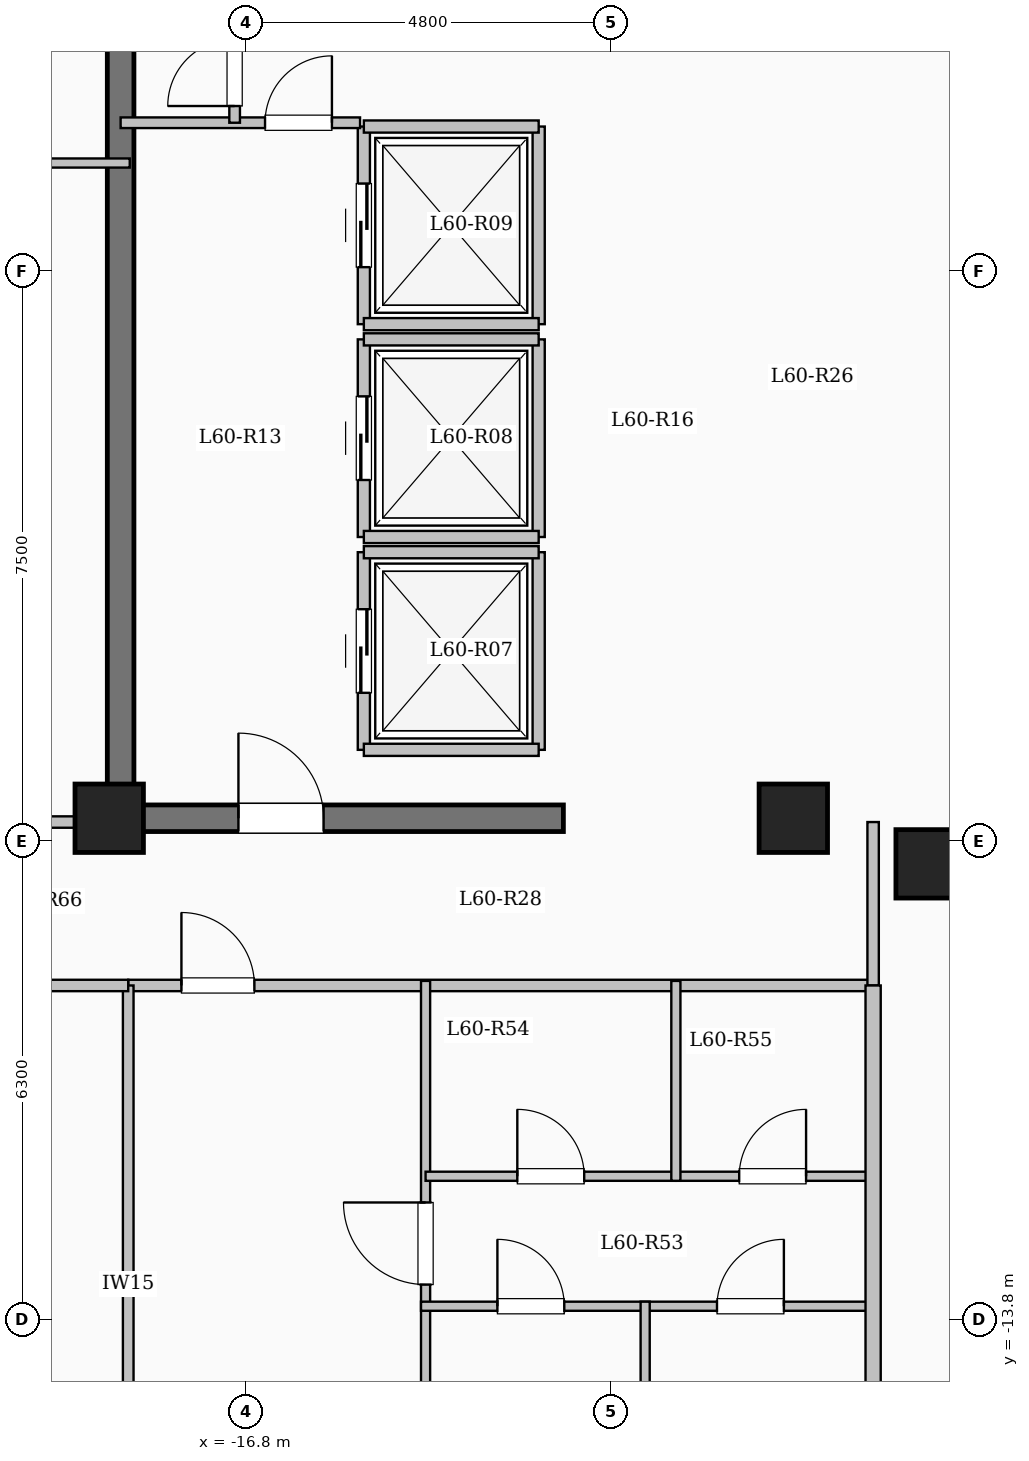
"""IFC4 building model, lengths in metres.
Left out: names, types, materials, properties, quantities, classifications, styles, units other than length and angle.
Written with IfcOpenShell. Run it as: python <this file> out.ifc"""

import sys

from ifc_helpers import new_model, si_unit, direction, frame, frame_2d, origin, origin_2d, place, context, subcontext, project, spatial, rectangle, extrude, element, fill, save


model = new_model("IFC4")
c1 = context("Model", 3, precision=1e-05, world=origin(), true_north=direction((0.0, 1.0)))
c2 = subcontext(c1, "Body", "Model", "MODEL_VIEW")
j1 = project(units=[si_unit("LENGTHUNIT", "METRE"), si_unit("PLANEANGLEUNIT", "RADIAN")], contexts=[c1])
p1 = place(None, origin())
s1 = spatial("IfcSite", under=j1, at=p1, CompositionType="ELEMENT")
p2 = place(p1, origin())
s2 = spatial("IfcBuilding", under=s1, at=p2, CompositionType="ELEMENT")
p3 = place(p2, frame((0.0, 0.0, 220.4)))
s3 = spatial("IfcBuildingStorey", under=s2, at=p3, CompositionType="ELEMENT", Elevation=220.4)
for number, where, z_axis, x_axis in (
    (1, (-7.8, -7.8, 0.0), (0.0, 0.0, 1.0), (1.0, 0.0, 0.0)),
    (2, (-9.6, -7.2, 0.0), (0.0, 0.0, 1.0), (1.0, 0.0, 0.0)),
    (3, (-18.6, -7.2, 0.0), (0.0, 0.0, 1.0), (1.0, 0.0, 0.0)),
):
    element("IfcColumn", number, at=place(p3, frame(where, z_axis=z_axis, x_axis=x_axis)), inside=s3, PredefinedType="COLUMN", context=c2, shape_type="SweptSolid", body=[
        extrude(rectangle(XDim=0.9, YDim=0.9, at=origin_2d()), origin(), (0.0, 0.0, 1.0), 3.35),
    ])
p4 = place(p3, frame((-15.25, -6.3, 0.0), z_axis=(0.0, 0.0, 1.0), x_axis=(0.0, 1.0, 0.0)))
e4 = element("IfcWall", 4, at=p4, inside=s3, PredefinedType="SOLIDWALL", context=c2, shape_type="SweptSolid", body=[
    extrude(rectangle(XDim=2.6, YDim=0.16, at=frame_2d((1.3, 0.0))), origin(), (0.0, 0.0, 1.0), 3.1),
])
p5 = place(p4, frame((0.75, 0.0, 0.0)))
e5 = element("IfcOpeningElement", 5, at=p5, cuts=e4, PredefinedType="OPENING", context=c2, shape_type="SweptSolid", body=[
    extrude(rectangle(XDim=1.1, YDim=2.15, at=frame_2d((0.55, 1.075))), frame((0.0, 0.09, 0.0), z_axis=(0.0, -1.0, 0.0), x_axis=(1.0, 0.0, 0.0)), (0.0, 0.0, 1.0), 0.18),
])
p6 = place(p3, frame((-12.95, -6.3, 0.0), z_axis=(0.0, 0.0, 1.0), x_axis=(0.0, 1.0, 0.0)))
e6 = element("IfcWall", 6, at=p6, inside=s3, PredefinedType="SOLIDWALL", context=c2, shape_type="SweptSolid", body=[
    extrude(rectangle(XDim=2.6, YDim=0.16, at=frame_2d((1.3, 0.0))), origin(), (0.0, 0.0, 1.0), 3.1),
])
for number, where, z_axis, x_axis in (
    (7, (-15.25, -6.3, 0.0), (0.0, 0.0, 1.0), (1.0, 0.0, 0.0)),
    (8, (-15.25, -3.7, 0.0), (0.0, 0.0, 1.0), (1.0, 0.0, 0.0)),
):
    element("IfcWall", number, at=place(p3, frame(where, z_axis=z_axis, x_axis=x_axis)), inside=s3, PredefinedType="SOLIDWALL", context=c2, shape_type="SweptSolid", body=[
        extrude(rectangle(XDim=2.3, YDim=0.16, at=frame_2d((1.15, 0.0))), origin(), (0.0, 0.0, 1.0), 3.1),
    ])
p7 = place(p3, frame((-15.25, -3.5, 0.0), z_axis=(0.0, 0.0, 1.0), x_axis=(0.0, 1.0, 0.0)))
e9 = element("IfcWall", 9, at=p7, inside=s3, PredefinedType="SOLIDWALL", context=c2, shape_type="SweptSolid", body=[
    extrude(rectangle(XDim=2.6, YDim=0.16, at=frame_2d((1.3, 0.0))), origin(), (0.0, 0.0, 1.0), 3.1),
])
p8 = place(p7, frame((0.75, 0.0, 0.0)))
e10 = element("IfcOpeningElement", 10, at=p8, cuts=e9, PredefinedType="OPENING", context=c2, shape_type="SweptSolid", body=[
    extrude(rectangle(XDim=1.1, YDim=2.15, at=frame_2d((0.55, 1.075))), frame((0.0, 0.09, 0.0), z_axis=(0.0, -1.0, 0.0), x_axis=(1.0, 0.0, 0.0)), (0.0, 0.0, 1.0), 0.18),
])
p9 = place(p3, frame((-12.95, -3.5, 0.0), z_axis=(0.0, 0.0, 1.0), x_axis=(0.0, 1.0, 0.0)))
e11 = element("IfcWall", 11, at=p9, inside=s3, PredefinedType="SOLIDWALL", context=c2, shape_type="SweptSolid", body=[
    extrude(rectangle(XDim=2.6, YDim=0.16, at=frame_2d((1.3, 0.0))), origin(), (0.0, 0.0, 1.0), 3.1),
])
for number, where, z_axis, x_axis in (
    (12, (-15.25, -3.5, 0.0), (0.0, 0.0, 1.0), (1.0, 0.0, 0.0)),
    (13, (-15.25, -0.9, 0.0), (0.0, 0.0, 1.0), (1.0, 0.0, 0.0)),
):
    element("IfcWall", number, at=place(p3, frame(where, z_axis=z_axis, x_axis=x_axis)), inside=s3, PredefinedType="SOLIDWALL", context=c2, shape_type="SweptSolid", body=[
        extrude(rectangle(XDim=2.3, YDim=0.16, at=frame_2d((1.15, 0.0))), origin(), (0.0, 0.0, 1.0), 3.1),
    ])
p10 = place(p3, frame((-15.25, -0.7, 0.0), z_axis=(0.0, 0.0, 1.0), x_axis=(0.0, 1.0, 0.0)))
e14 = element("IfcWall", 14, at=p10, inside=s3, PredefinedType="SOLIDWALL", context=c2, shape_type="SweptSolid", body=[
    extrude(rectangle(XDim=2.6, YDim=0.16, at=frame_2d((1.3, 0.0))), origin(), (0.0, 0.0, 1.0), 3.1),
])
p11 = place(p10, frame((0.75, 0.0, 0.0)))
e15 = element("IfcOpeningElement", 15, at=p11, cuts=e14, PredefinedType="OPENING", context=c2, shape_type="SweptSolid", body=[
    extrude(rectangle(XDim=1.1, YDim=2.15, at=frame_2d((0.55, 1.075))), frame((0.0, 0.09, 0.0), z_axis=(0.0, -1.0, 0.0), x_axis=(1.0, 0.0, 0.0)), (0.0, 0.0, 1.0), 0.18),
])
p12 = place(p3, frame((-12.95, -0.7, 0.0), z_axis=(0.0, 0.0, 1.0), x_axis=(0.0, 1.0, 0.0)))
e16 = element("IfcWall", 16, at=p12, inside=s3, PredefinedType="SOLIDWALL", context=c2, shape_type="SweptSolid", body=[
    extrude(rectangle(XDim=2.6, YDim=0.16, at=frame_2d((1.3, 0.0))), origin(), (0.0, 0.0, 1.0), 3.1),
])
for number, where, z_axis, x_axis in (
    (17, (-15.25, -0.7, 0.0), (0.0, 0.0, 1.0), (1.0, 0.0, 0.0)),
    (18, (-15.25, 1.9, 0.0), (0.0, 0.0, 1.0), (1.0, 0.0, 0.0)),
):
    element("IfcWall", number, at=place(p3, frame(where, z_axis=z_axis, x_axis=x_axis)), inside=s3, PredefinedType="SOLIDWALL", context=c2, shape_type="SweptSolid", body=[
        extrude(rectangle(XDim=2.3, YDim=0.16, at=frame_2d((1.15, 0.0))), origin(), (0.0, 0.0, 1.0), 3.1),
    ])
p13 = place(p3, frame((-18.45, -7.375, 0.0), z_axis=(0.0, 0.0, 1.0), x_axis=(0.0, 1.0, 0.0)))
e19 = element("IfcWall", 19, at=p13, inside=s3, PredefinedType="SHEAR", context=c2, shape_type="SweptSolid", body=[
    extrude(rectangle(XDim=14.05, YDim=0.35, at=frame_2d((7.025, 0.0))), origin(), (0.0, 0.0, 1.0), 3.35),
])
p14 = place(p3, frame((-18.625, -7.2, 0.0), z_axis=(0.0, 0.0, 1.0), x_axis=(1.0, 0.0, 0.0)))
e20 = element("IfcWall", 20, at=p14, inside=s3, PredefinedType="SHEAR", context=c2, shape_type="SweptSolid", body=[
    extrude(rectangle(XDim=6.0, YDim=0.35, at=frame_2d((3.0, 0.0))), origin(), (0.0, 0.0, 1.0), 3.35),
])
p15 = place(p14, frame((1.725, 0.0, 0.0)))
e21 = element("IfcOpeningElement", 21, at=p15, cuts=e20, PredefinedType="OPENING", context=c2, shape_type="SweptSolid", body=[
    extrude(rectangle(XDim=1.12, YDim=2.15, at=frame_2d((0.56, 1.075))), frame((0.0, 0.185, 0.0), z_axis=(0.0, -1.0, 0.0), x_axis=(1.0, 0.0, 0.0)), (0.0, 0.0, 1.0), 0.37),
])
p16 = place(p3, frame((-18.45, 1.95, 0.0), z_axis=(0.0, 0.0, 1.0), x_axis=(1.0, 0.0, 0.0)))
e22 = element("IfcWall", 22, at=p16, inside=s3, PredefinedType="PARTITIONING", context=c2, shape_type="SweptSolid", body=[
    extrude(rectangle(XDim=3.15, YDim=0.14, at=frame_2d((1.575, 0.0))), origin(), (0.0, 0.0, 1.0), 3.1),
])
p17 = place(p16, frame((1.9, 0.0, 0.0)))
e23 = element("IfcOpeningElement", 23, at=p17, cuts=e22, PredefinedType="OPENING", context=c2, shape_type="SweptSolid", body=[
    extrude(rectangle(XDim=0.88, YDim=2.1, at=frame_2d((0.44, 1.05))), frame((0.0, 0.08, 0.0), z_axis=(0.0, -1.0, 0.0), x_axis=(1.0, 0.0, 0.0)), (0.0, 0.0, 1.0), 0.16),
])
p18 = place(p3, frame((-16.95, 1.95, 0.0), z_axis=(0.0, 0.0, 1.0), x_axis=(0.0, 1.0, 0.0)))
e24 = element("IfcWall", 24, at=p18, inside=s3, PredefinedType="PARTITIONING", context=c2, shape_type="SweptSolid", body=[
    extrude(rectangle(XDim=1.3, YDim=0.14, at=frame_2d((0.65, 0.0))), origin(), (0.0, 0.0, 1.0), 3.1),
])
p19 = place(p18, frame((0.22, 0.0, 0.0)))
e25 = element("IfcOpeningElement", 25, at=p19, cuts=e24, PredefinedType="OPENING", context=c2, shape_type="SweptSolid", body=[
    extrude(rectangle(XDim=0.88, YDim=2.1, at=frame_2d((0.44, 1.05))), frame((0.0, 0.08, 0.0), z_axis=(0.0, -1.0, 0.0), x_axis=(1.0, 0.0, 0.0)), (0.0, 0.0, 1.0), 0.16),
])
p20 = place(p3, frame((-18.35, -9.4, 0.0), z_axis=(0.0, 0.0, 1.0), x_axis=(1.0, 0.0, 0.0)))
e26 = element("IfcWall", 26, at=p20, inside=s3, PredefinedType="PARTITIONING", context=c2, shape_type="SweptSolid", body=[
    extrude(rectangle(XDim=9.8, YDim=0.15, at=frame_2d((4.9, 0.0))), origin(), (0.0, 0.0, 1.0), 3.1),
])
p21 = place(p20, frame((0.7, 0.0, 0.0)))
e27 = element("IfcOpeningElement", 27, at=p21, cuts=e26, PredefinedType="OPENING", context=c2, shape_type="SweptSolid", body=[
    extrude(rectangle(XDim=0.96, YDim=2.15, at=frame_2d((0.48, 1.075))), frame((0.0, 0.085, 0.0), z_axis=(0.0, -1.0, 0.0), x_axis=(1.0, 0.0, 0.0)), (0.0, 0.0, 1.0), 0.17),
])
p22 = place(p3, frame((-8.55, -9.4, 0.0), z_axis=(0.0, 0.0, 1.0), x_axis=(0.0, 1.0, 0.0)))
e28 = element("IfcWall", 28, at=p22, inside=s3, PredefinedType="PARTITIONING", context=c2, shape_type="SweptSolid", body=[
    extrude(rectangle(XDim=2.15, YDim=0.15, at=frame_2d((1.075, 0.0))), origin(), (0.0, 0.0, 1.0), 3.1),
])
p23 = place(p3, frame((-14.438, -20.9, 0.0), z_axis=(0.0, 0.0, 1.0), x_axis=(0.0, 1.0, 0.0)))
e29 = element("IfcWall", 29, at=p23, inside=s3, PredefinedType="PARTITIONING", context=c2, shape_type="SweptSolid", body=[
    extrude(rectangle(XDim=11.56, YDim=0.12, at=frame_2d((5.78, 0.0))), origin(), (0.0, 0.0, 1.0), 3.1),
])
p24 = place(p23, frame((7.565, 0.0, 0.0)))
e30 = element("IfcOpeningElement", 30, at=p24, cuts=e29, PredefinedType="OPENING", context=c2, shape_type="SweptSolid", body=[
    extrude(rectangle(XDim=1.08, YDim=2.15, at=frame_2d((0.54, 1.075))), frame((0.0, 0.07, 0.0), z_axis=(0.0, -1.0, 0.0), x_axis=(1.0, 0.0, 0.0)), (0.0, 0.0, 1.0), 0.14),
])
p25 = place(p3, frame((-14.438, -11.91, 0.0), z_axis=(0.0, 0.0, 1.0), x_axis=(1.0, 0.0, 0.0)))
e31 = element("IfcWall", 31, at=p25, inside=s3, PredefinedType="PARTITIONING", context=c2, shape_type="SweptSolid", body=[
    extrude(rectangle(XDim=3.293, YDim=0.12, at=frame_2d((1.646, 0.0))), origin(), (0.0, 0.0, 1.0), 3.1),
])
p26 = place(p25, frame((1.207, 0.0, 0.0)))
e32 = element("IfcOpeningElement", 32, at=p26, cuts=e31, PredefinedType="OPENING", context=c2, shape_type="SweptSolid", body=[
    extrude(rectangle(XDim=0.88, YDim=2.1, at=frame_2d((0.44, 1.05))), frame((0.0, 0.07, 0.0), z_axis=(0.0, -1.0, 0.0), x_axis=(1.0, 0.0, 0.0)), (0.0, 0.0, 1.0), 0.14),
])
p27 = place(p3, frame((-11.145, -11.91, 0.0), z_axis=(0.0, 0.0, 1.0), x_axis=(1.0, 0.0, 0.0)))
e33 = element("IfcWall", 33, at=p27, inside=s3, PredefinedType="PARTITIONING", context=c2, shape_type="SweptSolid", body=[
    extrude(rectangle(XDim=2.545, YDim=0.12, at=frame_2d((1.272, 0.0))), origin(), (0.0, 0.0, 1.0), 3.1),
])
p28 = place(p27, frame((0.833, 0.0, 0.0)))
e34 = element("IfcOpeningElement", 34, at=p28, cuts=e33, PredefinedType="OPENING", context=c2, shape_type="SweptSolid", body=[
    extrude(rectangle(XDim=0.88, YDim=2.1, at=frame_2d((0.44, 1.05))), frame((0.0, 0.07, 0.0), z_axis=(0.0, -1.0, 0.0), x_axis=(1.0, 0.0, 0.0)), (0.0, 0.0, 1.0), 0.14),
])
p29 = place(p3, frame((-14.498, -13.62, 0.0), z_axis=(0.0, 0.0, 1.0), x_axis=(1.0, 0.0, 0.0)))
e35 = element("IfcWall", 35, at=p29, inside=s3, PredefinedType="PARTITIONING", context=c2, shape_type="SweptSolid", body=[
    extrude(rectangle(XDim=5.958, YDim=0.12, at=frame_2d((2.979, 0.0))), origin(), (0.0, 0.0, 1.0), 3.1),
])
p30 = place(p29, frame((1.005, 0.0, 0.0)))
e36 = element("IfcOpeningElement", 36, at=p30, cuts=e35, PredefinedType="OPENING", context=c2, shape_type="SweptSolid", body=[
    extrude(rectangle(XDim=0.88, YDim=2.1, at=frame_2d((0.44, 1.05))), frame((0.0, 0.07, 0.0), z_axis=(0.0, -1.0, 0.0), x_axis=(1.0, 0.0, 0.0)), (0.0, 0.0, 1.0), 0.14),
])
p31 = place(p29, frame((3.894, 0.0, 0.0)))
e37 = element("IfcOpeningElement", 37, at=p31, cuts=e35, PredefinedType="OPENING", context=c2, shape_type="SweptSolid", body=[
    extrude(rectangle(XDim=0.88, YDim=2.1, at=frame_2d((0.44, 1.05))), frame((0.0, 0.07, 0.0), z_axis=(0.0, -1.0, 0.0), x_axis=(1.0, 0.0, 0.0)), (0.0, 0.0, 1.0), 0.14),
])
p32 = place(p3, frame((-11.145, -11.97, 0.0), z_axis=(0.0, 0.0, 1.0), x_axis=(0.0, 1.0, 0.0)))
e38 = element("IfcWall", 38, at=p32, inside=s3, PredefinedType="PARTITIONING", context=c2, shape_type="SweptSolid", body=[
    extrude(rectangle(XDim=2.63, YDim=0.12, at=frame_2d((1.315, 0.0))), origin(), (0.0, 0.0, 1.0), 3.1),
])
p33 = place(p3, frame((-11.549, -20.9, 0.0), z_axis=(0.0, 0.0, 1.0), x_axis=(0.0, 1.0, 0.0)))
e39 = element("IfcWall", 39, at=p33, inside=s3, PredefinedType="PARTITIONING", context=c2, shape_type="SweptSolid", body=[
    extrude(rectangle(XDim=7.34, YDim=0.12, at=frame_2d((3.67, 0.0))), origin(), (0.0, 0.0, 1.0), 3.1),
])
p34 = place(p3, frame((-8.55, -21.504, 0.0), z_axis=(0.0, 0.0, 1.0), x_axis=(0.0, 1.0, 0.0)))
e40 = element("IfcWall", 40, at=p34, inside=s3, PredefinedType="SOLIDWALL", context=c2, shape_type="SweptSolid", body=[
    extrude(rectangle(XDim=12.104, YDim=0.2, at=frame_2d((6.052, 0.0))), origin(), (0.0, 0.0, 1.0), 3.1),
])
p35 = place(p3, frame((-23.58, -7.25, 0.0), z_axis=(0.0, 0.0, 1.0), x_axis=(1.0, 0.0, 0.0)))
e41 = element("IfcWall", 41, at=p35, inside=s3, PredefinedType="PARTITIONING", context=c2, shape_type="SweptSolid", body=[
    extrude(rectangle(XDim=5.13, YDim=0.15, at=frame_2d((2.565, 0.0))), origin(), (0.0, 0.0, 1.0), 3.1),
])
p36 = place(p35, frame((2.18, 0.0, 0.0)))
e42 = element("IfcOpeningElement", 42, at=p36, cuts=e41, PredefinedType="OPENING", context=c2, shape_type="SweptSolid", body=[
    extrude(rectangle(XDim=0.96, YDim=2.15, at=frame_2d((0.48, 1.075))), frame((0.0, 0.085, 0.0), z_axis=(0.0, -1.0, 0.0), x_axis=(1.0, 0.0, 0.0)), (0.0, 0.0, 1.0), 0.17),
])
p37 = place(p3, frame((-18.35, -17.25, 0.0), z_axis=(0.0, 0.0, 1.0), x_axis=(0.0, 1.0, 0.0)))
e43 = element("IfcWall", 43, at=p37, inside=s3, PredefinedType="PARTITIONING", context=c2, shape_type="SweptSolid", body=[
    extrude(rectangle(XDim=7.85, YDim=0.14, at=frame_2d((3.925, 0.0))), origin(), (0.0, 0.0, 1.0), 3.1),
])
p38 = place(p3, frame((-23.58, -9.4, 0.0), z_axis=(0.0, 0.0, 1.0), x_axis=(1.0, 0.0, 0.0)))
e44 = element("IfcWall", 44, at=p38, inside=s3, PredefinedType="PARTITIONING", context=c2, shape_type="SweptSolid", body=[
    extrude(rectangle(XDim=5.23, YDim=0.15, at=frame_2d((2.615, 0.0))), origin(), (0.0, 0.0, 1.0), 3.1),
])
p39 = place(p38, frame((2.14, 0.0, 0.0)))
e45 = element("IfcOpeningElement", 45, at=p39, cuts=e44, PredefinedType="OPENING", context=c2, shape_type="SweptSolid", body=[
    extrude(rectangle(XDim=0.95, YDim=2.15, at=frame_2d((0.475, 1.075))), frame((0.0, 0.085, 0.0), z_axis=(0.0, -1.0, 0.0), x_axis=(1.0, 0.0, 0.0)), (0.0, 0.0, 1.0), 0.17),
])
p40 = place(p3, frame((-23.7, 1.42, 0.0), z_axis=(0.0, 0.0, 1.0), x_axis=(1.0, 0.0, 0.0)))
e46 = element("IfcWall", 46, at=p40, inside=s3, PredefinedType="PARTITIONING", context=c2, shape_type="SweptSolid", body=[
    extrude(rectangle(XDim=5.37, YDim=0.12, at=frame_2d((2.685, 0.0))), origin(), (0.0, 0.0, 1.0), 3.1),
])
p41 = place(p40, frame((0.937, 0.0, 0.0)))
e47 = element("IfcOpeningElement", 47, at=p41, cuts=e46, PredefinedType="OPENING", context=c2, shape_type="SweptSolid", body=[
    extrude(rectangle(XDim=0.88, YDim=2.1, at=frame_2d((0.44, 1.05))), frame((0.0, 0.07, 0.0), z_axis=(0.0, -1.0, 0.0), x_axis=(1.0, 0.0, 0.0)), (0.0, 0.0, 1.0), 0.14),
])
p42 = place(p40, frame((3.452, 0.0, 0.0)))
e48 = element("IfcOpeningElement", 48, at=p42, cuts=e46, PredefinedType="OPENING", context=c2, shape_type="SweptSolid", body=[
    extrude(rectangle(XDim=0.88, YDim=2.1, at=frame_2d((0.44, 1.05))), frame((0.0, 0.07, 0.0), z_axis=(0.0, -1.0, 0.0), x_axis=(1.0, 0.0, 0.0)), (0.0, 0.0, 1.0), 0.14),
])
p43 = place(p5, origin())
e49 = element("IfcDoor", 49, at=p43, inside=s3, OperationType="SLIDING_TO_LEFT", PredefinedType="DOOR", context=c2, shape_type="SweptSolid", body=[
    extrude(rectangle(XDim=1.1, YDim=2.15, at=frame_2d((0.55, 1.075))), frame((0.0, 0.025, 0.0), z_axis=(0.0, -1.0, 0.0), x_axis=(1.0, 0.0, 0.0)), (0.0, 0.0, 1.0), 0.05),
])
fill(e5, e49)
p44 = place(p8, origin())
e50 = element("IfcDoor", 50, at=p44, inside=s3, OperationType="SLIDING_TO_LEFT", PredefinedType="DOOR", context=c2, shape_type="SweptSolid", body=[
    extrude(rectangle(XDim=1.1, YDim=2.15, at=frame_2d((0.55, 1.075))), frame((0.0, 0.025, 0.0), z_axis=(0.0, -1.0, 0.0), x_axis=(1.0, 0.0, 0.0)), (0.0, 0.0, 1.0), 0.05),
])
fill(e10, e50)
p45 = place(p11, origin())
e51 = element("IfcDoor", 51, at=p45, inside=s3, OperationType="SLIDING_TO_LEFT", PredefinedType="DOOR", context=c2, shape_type="SweptSolid", body=[
    extrude(rectangle(XDim=1.1, YDim=2.15, at=frame_2d((0.55, 1.075))), frame((0.0, 0.025, 0.0), z_axis=(0.0, -1.0, 0.0), x_axis=(1.0, 0.0, 0.0)), (0.0, 0.0, 1.0), 0.05),
])
fill(e15, e51)
p46 = place(p15, origin())
e52 = element("IfcDoor", 52, at=p46, inside=s3, OperationType="SINGLE_SWING_LEFT", PredefinedType="DOOR", context=c2, shape_type="SweptSolid", body=[
    extrude(rectangle(XDim=1.12, YDim=2.15, at=frame_2d((0.56, 1.075))), frame((0.0, 0.025, 0.0), z_axis=(0.0, -1.0, 0.0), x_axis=(1.0, 0.0, 0.0)), (0.0, 0.0, 1.0), 0.05),
])
fill(e21, e52)
p47 = place(p17, origin())
e53 = element("IfcDoor", 53, at=p47, inside=s3, OperationType="SINGLE_SWING_RIGHT", PredefinedType="DOOR", context=c2, shape_type="SweptSolid", body=[
    extrude(rectangle(XDim=0.88, YDim=2.1, at=frame_2d((0.44, 1.05))), frame((0.0, 0.025, 0.0), z_axis=(0.0, -1.0, 0.0), x_axis=(1.0, 0.0, 0.0)), (0.0, 0.0, 1.0), 0.05),
])
fill(e23, e53)
p48 = place(p19, origin())
e54 = element("IfcDoor", 54, at=p48, inside=s3, OperationType="SINGLE_SWING_LEFT", PredefinedType="DOOR", context=c2, shape_type="SweptSolid", body=[
    extrude(rectangle(XDim=0.88, YDim=2.1, at=frame_2d((0.44, 1.05))), frame((0.0, 0.025, 0.0), z_axis=(0.0, -1.0, 0.0), x_axis=(1.0, 0.0, 0.0)), (0.0, 0.0, 1.0), 0.05),
])
fill(e25, e54)
p49 = place(p21, origin())
e55 = element("IfcDoor", 55, at=p49, inside=s3, OperationType="SINGLE_SWING_LEFT", PredefinedType="DOOR", context=c2, shape_type="SweptSolid", body=[
    extrude(rectangle(XDim=0.96, YDim=2.15, at=frame_2d((0.48, 1.075))), frame((0.0, 0.025, 0.0), z_axis=(0.0, -1.0, 0.0), x_axis=(1.0, 0.0, 0.0)), (0.0, 0.0, 1.0), 0.05),
])
fill(e27, e55)
p50 = place(p24, origin())
e56 = element("IfcDoor", 56, at=p50, inside=s3, OperationType="SINGLE_SWING_RIGHT", PredefinedType="DOOR", context=c2, shape_type="SweptSolid", body=[
    extrude(rectangle(XDim=1.08, YDim=2.15, at=frame_2d((0.54, 1.075))), frame((0.0, 0.025, 0.0), z_axis=(0.0, -1.0, 0.0), x_axis=(1.0, 0.0, 0.0)), (0.0, 0.0, 1.0), 0.05),
])
fill(e30, e56)
p51 = place(p26, origin())
e57 = element("IfcDoor", 57, at=p51, inside=s3, OperationType="SINGLE_SWING_LEFT", PredefinedType="DOOR", context=c2, shape_type="SweptSolid", body=[
    extrude(rectangle(XDim=0.88, YDim=2.1, at=frame_2d((0.44, 1.05))), frame((0.0, 0.025, 0.0), z_axis=(0.0, -1.0, 0.0), x_axis=(1.0, 0.0, 0.0)), (0.0, 0.0, 1.0), 0.05),
])
fill(e32, e57)
p52 = place(p28, origin())
e58 = element("IfcDoor", 58, at=p52, inside=s3, OperationType="SINGLE_SWING_RIGHT", PredefinedType="DOOR", context=c2, shape_type="SweptSolid", body=[
    extrude(rectangle(XDim=0.88, YDim=2.1, at=frame_2d((0.44, 1.05))), frame((0.0, 0.025, 0.0), z_axis=(0.0, -1.0, 0.0), x_axis=(1.0, 0.0, 0.0)), (0.0, 0.0, 1.0), 0.05),
])
fill(e34, e58)
p53 = place(p30, origin())
e59 = element("IfcDoor", 59, at=p53, inside=s3, OperationType="SINGLE_SWING_LEFT", PredefinedType="DOOR", context=c2, shape_type="SweptSolid", body=[
    extrude(rectangle(XDim=0.88, YDim=2.1, at=frame_2d((0.44, 1.05))), frame((0.0, 0.025, 0.0), z_axis=(0.0, -1.0, 0.0), x_axis=(1.0, 0.0, 0.0)), (0.0, 0.0, 1.0), 0.05),
])
fill(e36, e59)
p54 = place(p31, origin())
e60 = element("IfcDoor", 60, at=p54, inside=s3, OperationType="SINGLE_SWING_RIGHT", PredefinedType="DOOR", context=c2, shape_type="SweptSolid", body=[
    extrude(rectangle(XDim=0.88, YDim=2.1, at=frame_2d((0.44, 1.05))), frame((0.0, 0.025, 0.0), z_axis=(0.0, -1.0, 0.0), x_axis=(1.0, 0.0, 0.0)), (0.0, 0.0, 1.0), 0.05),
])
fill(e37, e60)
save(model, sys.argv[1])
